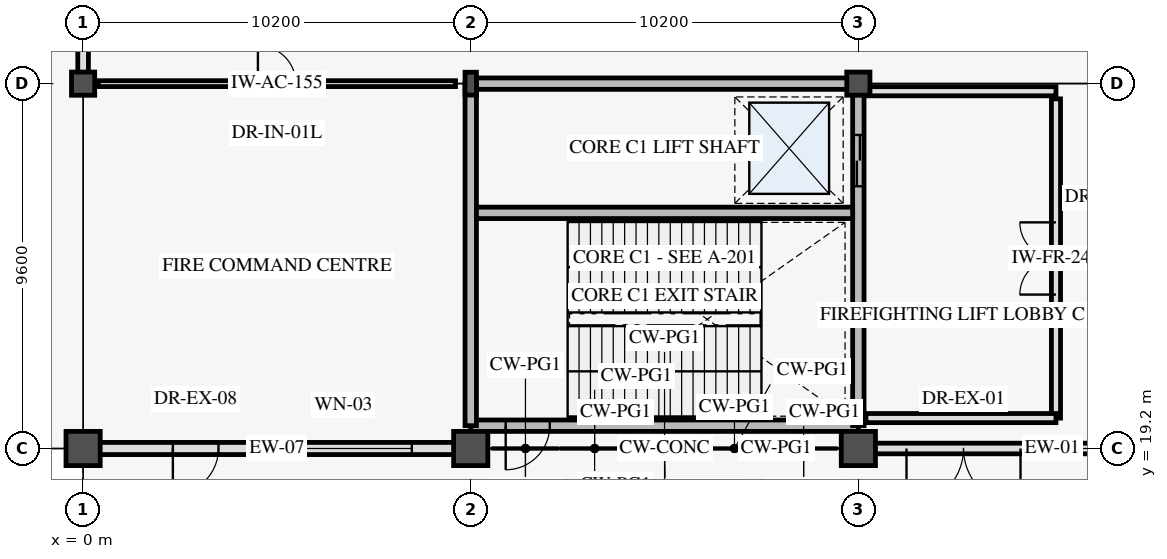
"""IFC4 building model, lengths in metres.
Left out: names, types, materials, properties, quantities, classifications, styles, units other than length and angle.
Written with IfcOpenShell. Run it as: python <this file> out.ifc"""

import sys

from ifc_helpers import new_model, si_unit, direction, frame, frame_2d, origin, origin_2d, place, context, subcontext, project, spatial, rectangle, hollow_circle, i_section, extrude, element, fill, save


model = new_model("IFC4")
c1 = context("Model", 3, precision=1e-05, world=origin(), true_north=direction((0.0, 1.0)))
c2 = subcontext(c1, "Body", "Model", "MODEL_VIEW")
j1 = project(units=[si_unit("LENGTHUNIT", "METRE"), si_unit("PLANEANGLEUNIT", "RADIAN")], contexts=[c1])
p1 = place(None, origin())
s1 = spatial("IfcSite", under=j1, at=p1, CompositionType="ELEMENT")
p2 = place(p1, origin())
s2 = spatial("IfcBuilding", under=s1, at=p2, CompositionType="ELEMENT")
p3 = place(p2, origin())
s3 = spatial("IfcBuildingStorey", under=s2, at=p3, CompositionType="ELEMENT", Elevation=0.0)
p4 = place(p3, frame((0.0, 19.2, 0.0), z_axis=(0.0, 0.0, 1.0), x_axis=(1.0, 0.0, 0.0)))
e1 = element("IfcColumn", 1, at=p4, inside=s3, PredefinedType="COLUMN", context=c2, shape_type="SweptSolid", body=[
    extrude(rectangle(XDim=0.9, YDim=0.9, at=origin_2d()), origin(), (0.0, 0.0, 1.0), 5.4),
])
p5 = place(p3, frame((0.0, 28.8, 0.0), z_axis=(0.0, 0.0, 1.0), x_axis=(1.0, 0.0, 0.0)))
e2 = element("IfcColumn", 2, at=p5, inside=s3, PredefinedType="COLUMN", context=c2, shape_type="SweptSolid", body=[
    extrude(hollow_circle(Radius=0.305, WallThickness=0.025, at=origin_2d()), origin(), (0.0, 0.0, 1.0), 5.4),
])
p6 = place(p3, frame((10.2, 19.2, 0.0), z_axis=(0.0, 0.0, 1.0), x_axis=(1.0, 0.0, 0.0)))
e3 = element("IfcColumn", 3, at=p6, inside=s3, PredefinedType="COLUMN", context=c2, shape_type="SweptSolid", body=[
    extrude(rectangle(XDim=0.9, YDim=0.9, at=origin_2d()), origin(), (0.0, 0.0, 1.0), 5.4),
])
p7 = place(p3, frame((10.2, 28.8, 0.0), z_axis=(0.0, 0.0, 1.0), x_axis=(1.0, 0.0, 0.0)))
e4 = element("IfcColumn", 4, at=p7, inside=s3, PredefinedType="COLUMN", context=c2, shape_type="SweptSolid", body=[
    extrude(i_section(OverallWidth=0.3, OverallDepth=0.6, WebThickness=0.015, FlangeThickness=0.03, FilletRadius=0.027, at=origin_2d()), origin(), (0.0, 0.0, 1.0), 5.4),
])
p8 = place(p3, frame((20.4, 19.2, 0.0), z_axis=(0.0, 0.0, 1.0), x_axis=(1.0, 0.0, 0.0)))
e5 = element("IfcColumn", 5, at=p8, inside=s3, PredefinedType="COLUMN", context=c2, shape_type="SweptSolid", body=[
    extrude(rectangle(XDim=0.9, YDim=0.9, at=origin_2d()), origin(), (0.0, 0.0, 1.0), 5.4),
])
p9 = place(p3, frame((20.4, 28.8, 0.0), z_axis=(0.0, 0.0, 1.0), x_axis=(1.0, 0.0, 0.0)))
e6 = element("IfcColumn", 6, at=p9, inside=s3, PredefinedType="COLUMN", context=c2, shape_type="SweptSolid", body=[
    extrude(hollow_circle(Radius=0.305, WallThickness=0.025, at=origin_2d()), origin(), (0.0, 0.0, 1.0), 5.4),
])
p10 = place(p3, frame((10.2, 19.8, 0.0), z_axis=(0.0, 0.0, 1.0), x_axis=(1.0, 0.0, 0.0)))
e7 = element("IfcWall", 7, at=p10, inside=s3, PredefinedType="SHEAR", context=c2, shape_type="SweptSolid", body=[
    extrude(rectangle(XDim=10.2, YDim=0.3, at=frame_2d((5.1, 0.0))), origin(), (0.0, 0.0, 1.0), 5.4),
])
p11 = place(p10, frame((0.92, 0.0, 0.0)))
e8 = element("IfcOpeningElement", 8, at=p11, cuts=e7, PredefinedType="OPENING", context=c2, shape_type="SweptSolid", body=[
    extrude(rectangle(XDim=1.16, YDim=2.2, at=frame_2d((0.58, 1.1))), frame((0.0, 0.16, 0.0), z_axis=(0.0, -1.0, 0.0), x_axis=(1.0, 0.0, 0.0)), (0.0, 0.0, 1.0), 0.32),
])
p12 = place(p3, frame((10.2, 28.8, 0.0), z_axis=(0.0, 0.0, 1.0), x_axis=(1.0, 0.0, 0.0)))
e9 = element("IfcWall", 9, at=p12, inside=s3, PredefinedType="SHEAR", context=c2, shape_type="SweptSolid", body=[
    extrude(rectangle(XDim=10.2, YDim=0.3, at=frame_2d((5.1, 0.0))), origin(), (0.0, 0.0, 1.0), 5.4),
])
p13 = place(p3, frame((10.2, 19.8, 0.0), z_axis=(0.0, 0.0, 1.0), x_axis=(0.0, 1.0, 0.0)))
e10 = element("IfcWall", 10, at=p13, inside=s3, PredefinedType="SHEAR", context=c2, shape_type="SweptSolid", body=[
    extrude(rectangle(XDim=9.0, YDim=0.3, at=frame_2d((4.5, 0.0))), origin(), (0.0, 0.0, 1.0), 5.4),
])
p14 = place(p3, frame((20.4, 19.8, 0.0), z_axis=(0.0, 0.0, 1.0), x_axis=(0.0, 1.0, 0.0)))
e11 = element("IfcWall", 11, at=p14, inside=s3, PredefinedType="SHEAR", context=c2, shape_type="SweptSolid", body=[
    extrude(rectangle(XDim=9.0, YDim=0.3, at=frame_2d((4.5, 0.0))), origin(), (0.0, 0.0, 1.0), 5.4),
])
p15 = place(p14, frame((6.3, 0.0, 0.0)))
e12 = element("IfcOpeningElement", 12, at=p15, cuts=e11, PredefinedType="OPENING", context=c2, shape_type="SweptSolid", body=[
    extrude(rectangle(XDim=1.35, YDim=2.3, at=frame_2d((0.675, 1.15))), frame((0.0, 0.16, 0.0), z_axis=(0.0, -1.0, 0.0), x_axis=(1.0, 0.0, 0.0)), (0.0, 0.0, 1.0), 0.32),
])
p16 = place(p3, frame((0.24, 19.2, 0.0), z_axis=(0.0, 0.0, 1.0), x_axis=(1.0, 0.0, 0.0)))
e13 = element("IfcWall", 13, at=p16, inside=s3, PredefinedType="SOLIDWALL", context=c2, shape_type="SweptSolid", body=[
    extrude(rectangle(XDim=9.72, YDim=0.32, at=frame_2d((4.86, 0.0))), origin(), (0.0, 0.0, 1.0), 3.68),
])
p17 = place(p16, frame((2.122, 0.0, 0.0)))
e14 = element("IfcOpeningElement", 14, at=p17, cuts=e13, PredefinedType="OPENING", context=c2, shape_type="SweptSolid", body=[
    extrude(rectangle(XDim=1.2, YDim=2.2, at=frame_2d((0.6, 1.1))), frame((0.0, 0.17, 0.0), z_axis=(0.0, -1.0, 0.0), x_axis=(1.0, 0.0, 0.0)), (0.0, 0.0, 1.0), 0.34),
])
p18 = place(p16, frame((4.81, 0.0, 0.9)))
e15 = element("IfcOpeningElement", 15, at=p18, cuts=e13, PredefinedType="OPENING", context=c2, shape_type="SweptSolid", body=[
    extrude(rectangle(XDim=3.6, YDim=2.1, at=frame_2d((1.8, 1.05))), frame((0.0, 0.17, 0.0), z_axis=(0.0, -1.0, 0.0), x_axis=(1.0, 0.0, 0.0)), (0.0, 0.0, 1.0), 0.34),
])
p19 = place(p3, frame((20.64, 19.2, 0.0), z_axis=(0.0, 0.0, 1.0), x_axis=(1.0, 0.0, 0.0)))
e16 = element("IfcWall", 16, at=p19, inside=s3, PredefinedType="STANDARD", context=c2, shape_type="SweptSolid", body=[
    extrude(rectangle(XDim=9.72, YDim=0.28, at=frame_2d((4.86, 0.0))), origin(), (0.0, 0.0, 1.0), 3.68),
])
p20 = place(p19, frame((1.027, 0.0, 0.0)))
e17 = element("IfcOpeningElement", 17, at=p20, cuts=e16, PredefinedType="OPENING", context=c2, shape_type="SweptSolid", body=[
    extrude(rectangle(XDim=3.0, YDim=2.5, at=frame_2d((1.5, 1.25))), frame((0.0, 0.15, 0.0), z_axis=(0.0, -1.0, 0.0), x_axis=(1.0, 0.0, 0.0)), (0.0, 0.0, 1.0), 0.3),
])
p21 = place(p19, frame((5.198, 0.0, 0.85)))
e18 = element("IfcOpeningElement", 18, at=p21, cuts=e16, PredefinedType="OPENING", context=c2, shape_type="SweptSolid", body=[
    extrude(rectangle(XDim=3.6, YDim=2.1, at=frame_2d((1.8, 1.05))), frame((0.0, 0.15, 0.0), z_axis=(0.0, -1.0, 0.0), x_axis=(1.0, 0.0, 0.0)), (0.0, 0.0, 1.0), 0.3),
])
p22 = place(p3, frame((0.0, 29.04, 0.0), z_axis=(0.0, 0.0, 1.0), x_axis=(0.0, 1.0, 0.0)))
e19 = element("IfcWall", 19, at=p22, inside=s3, PredefinedType="STANDARD", context=c2, shape_type="SweptSolid", body=[
    extrude(rectangle(XDim=11.32, YDim=0.28, at=frame_2d((5.66, 0.0))), origin(), (0.0, 0.0, 1.0), 3.68),
])
p23 = place(p22, frame((1.67, 0.0, 0.0)))
e20 = element("IfcOpeningElement", 20, at=p23, cuts=e19, PredefinedType="OPENING", context=c2, shape_type="SweptSolid", body=[
    extrude(rectangle(XDim=3.0, YDim=2.5, at=frame_2d((1.5, 1.25))), frame((0.0, 0.15, 0.0), z_axis=(0.0, -1.0, 0.0), x_axis=(1.0, 0.0, 0.0)), (0.0, 0.0, 1.0), 0.3),
])
p24 = place(p22, frame((6.65, 0.0, 0.0)))
e21 = element("IfcOpeningElement", 21, at=p24, cuts=e19, PredefinedType="OPENING", context=c2, shape_type="SweptSolid", body=[
    extrude(rectangle(XDim=3.0, YDim=2.5, at=frame_2d((1.5, 1.25))), frame((0.0, 0.15, 0.0), z_axis=(0.0, -1.0, 0.0), x_axis=(1.0, 0.0, 0.0)), (0.0, 0.0, 1.0), 0.3),
])
p25 = place(p3, frame((10.35, 25.4, 0.0), z_axis=(0.0, 0.0, 1.0), x_axis=(1.0, 0.0, 0.0)))
e22 = element("IfcWall", 22, at=p25, inside=s3, PredefinedType="SHEAR", context=c2, shape_type="SweptSolid", body=[
    extrude(rectangle(XDim=9.9, YDim=0.3, at=frame_2d((4.95, 0.0))), origin(), (0.0, 0.0, 1.0), 5.4),
])
p26 = place(p3, frame((25.6, 20.0, 0.0), z_axis=(0.0, 0.0, 1.0), x_axis=(0.0, 1.0, 0.0)))
e23 = element("IfcWall", 23, at=p26, inside=s3, PredefinedType="PARTITIONING", context=c2, shape_type="SweptSolid", body=[
    extrude(rectangle(XDim=8.4, YDim=0.24, at=frame_2d((4.2, 0.0))), origin(), (0.0, 0.0, 1.0), 4.08),
])
p27 = place(p26, frame((3.25, 0.0, 0.0)))
e24 = element("IfcOpeningElement", 24, at=p27, cuts=e23, PredefinedType="OPENING", context=c2, shape_type="SweptSolid", body=[
    extrude(rectangle(XDim=1.9, YDim=2.25, at=frame_2d((0.95, 1.125))), frame((0.0, 0.13, 0.0), z_axis=(0.0, -1.0, 0.0), x_axis=(1.0, 0.0, 0.0)), (0.0, 0.0, 1.0), 0.26),
])
for number, where, z_axis, x_axis in (
    (25, (20.6, 28.6, 0.0), (0.0, 0.0, 1.0), (1.0, 0.0, 0.0)),
    (26, (20.6, 20.0, 0.0), (0.0, 0.0, 1.0), (1.0, 0.0, 0.0)),
):
    element("IfcWall", number, at=place(p3, frame(where, z_axis=z_axis, x_axis=x_axis)), inside=s3, PredefinedType="PARTITIONING", context=c2, shape_type="SweptSolid", body=[
        extrude(rectangle(XDim=5.0, YDim=0.24, at=frame_2d((2.5, 0.0))), origin(), (0.0, 0.0, 1.0), 4.08),
    ])
p28 = place(p3, frame((0.4, 28.8, 0.0), z_axis=(0.0, 0.0, 1.0), x_axis=(1.0, 0.0, 0.0)))
e27 = element("IfcWall", 27, at=p28, inside=s3, PredefinedType="PARTITIONING", context=c2, shape_type="SweptSolid", body=[
    extrude(rectangle(XDim=9.4, YDim=0.155, at=frame_2d((4.7, 0.0))), origin(), (0.0, 0.0, 1.0), 4.08),
])
p29 = place(p28, frame((4.2, 0.0, 0.0)))
e28 = element("IfcOpeningElement", 28, at=p29, cuts=e27, PredefinedType="OPENING", context=c2, shape_type="SweptSolid", body=[
    extrude(rectangle(XDim=1.0, YDim=2.15, at=frame_2d((0.5, 1.075))), frame((0.0, 0.087, 0.0), z_axis=(0.0, -1.0, 0.0), x_axis=(1.0, 0.0, 0.0)), (0.0, 0.0, 1.0), 0.175),
])
p30 = place(p17, frame((1.2, 0.0, 0.0), z_axis=(0.0, 0.0, 1.0), x_axis=(-1.0, 0.0, 0.0)))
e29 = element("IfcDoor", 29, at=p30, inside=s3, OperationType="SINGLE_SWING_LEFT", PredefinedType="DOOR", context=c2, shape_type="SweptSolid", body=[
    extrude(rectangle(XDim=1.2, YDim=2.2, at=frame_2d((0.6, 1.1))), frame((0.0, 0.025, 0.0), z_axis=(0.0, -1.0, 0.0), x_axis=(1.0, 0.0, 0.0)), (0.0, 0.0, 1.0), 0.05),
])
fill(e14, e29)
p31 = place(p18, origin())
e30 = element("IfcWindow", 30, at=p31, inside=s3, PartitioningType="TRIPLE_PANEL_VERTICAL", PredefinedType="WINDOW", context=c2, shape_type="SweptSolid", body=[
    extrude(rectangle(XDim=3.6, YDim=2.1, at=frame_2d((1.8, 1.05))), frame((0.0, 0.03, 0.0), z_axis=(0.0, -1.0, 0.0), x_axis=(1.0, 0.0, 0.0)), (0.0, 0.0, 1.0), 0.06),
])
fill(e15, e30)
p32 = place(p20, frame((3.0, 0.0, 0.0), z_axis=(0.0, 0.0, 1.0), x_axis=(-1.0, 0.0, 0.0)))
e31 = element("IfcDoor", 31, at=p32, inside=s3, OperationType="DOUBLE_DOOR_SINGLE_SWING", PredefinedType="DOOR", context=c2, shape_type="SweptSolid", body=[
    extrude(rectangle(XDim=3.0, YDim=2.5, at=frame_2d((1.5, 1.25))), frame((0.0, 0.025, 0.0), z_axis=(0.0, -1.0, 0.0), x_axis=(1.0, 0.0, 0.0)), (0.0, 0.0, 1.0), 0.05),
])
fill(e17, e31)
p33 = place(p21, origin())
e32 = element("IfcWindow", 32, at=p33, inside=s3, PartitioningType="TRIPLE_PANEL_VERTICAL", PredefinedType="WINDOW", context=c2, shape_type="SweptSolid", body=[
    extrude(rectangle(XDim=3.6, YDim=2.1, at=frame_2d((1.8, 1.05))), frame((0.0, 0.03, 0.0), z_axis=(0.0, -1.0, 0.0), x_axis=(1.0, 0.0, 0.0)), (0.0, 0.0, 1.0), 0.06),
])
fill(e18, e32)
p34 = place(p11, frame((1.16, 0.0, 0.0), z_axis=(0.0, 0.0, 1.0), x_axis=(-1.0, 0.0, 0.0)))
e33 = element("IfcDoor", 33, at=p34, inside=s3, OperationType="SINGLE_SWING_LEFT", PredefinedType="DOOR", context=c2, shape_type="SweptSolid", body=[
    extrude(rectangle(XDim=1.16, YDim=2.2, at=frame_2d((0.58, 1.1))), frame((0.0, 0.025, 0.0), z_axis=(0.0, -1.0, 0.0), x_axis=(1.0, 0.0, 0.0)), (0.0, 0.0, 1.0), 0.05),
])
fill(e8, e33)
p35 = place(p15, origin())
e34 = element("IfcDoor", 34, at=p35, inside=s3, OperationType="DOUBLE_DOOR_SLIDING", PredefinedType="DOOR", context=c2, shape_type="SweptSolid", body=[
    extrude(rectangle(XDim=1.35, YDim=2.3, at=frame_2d((0.675, 1.15))), frame((0.0, 0.025, 0.0), z_axis=(0.0, -1.0, 0.0), x_axis=(1.0, 0.0, 0.0)), (0.0, 0.0, 1.0), 0.05),
])
fill(e12, e34)
p36 = place(p27, origin())
e35 = element("IfcDoor", 35, at=p36, inside=s3, OperationType="DOUBLE_DOOR_SINGLE_SWING", PredefinedType="DOOR", context=c2, shape_type="SweptSolid", body=[
    extrude(rectangle(XDim=1.9, YDim=2.25, at=frame_2d((0.95, 1.125))), frame((0.0, 0.025, 0.0), z_axis=(0.0, -1.0, 0.0), x_axis=(1.0, 0.0, 0.0)), (0.0, 0.0, 1.0), 0.05),
])
fill(e24, e35)
p37 = place(p29, origin())
e36 = element("IfcDoor", 36, at=p37, inside=s3, OperationType="SINGLE_SWING_LEFT", PredefinedType="DOOR", context=c2, shape_type="SweptSolid", body=[
    extrude(rectangle(XDim=1.0, YDim=2.15, at=frame_2d((0.5, 1.075))), frame((0.0, 0.025, 0.0), z_axis=(0.0, -1.0, 0.0), x_axis=(1.0, 0.0, 0.0)), (0.0, 0.0, 1.0), 0.05),
])
fill(e28, e36)
save(model, sys.argv[1])
